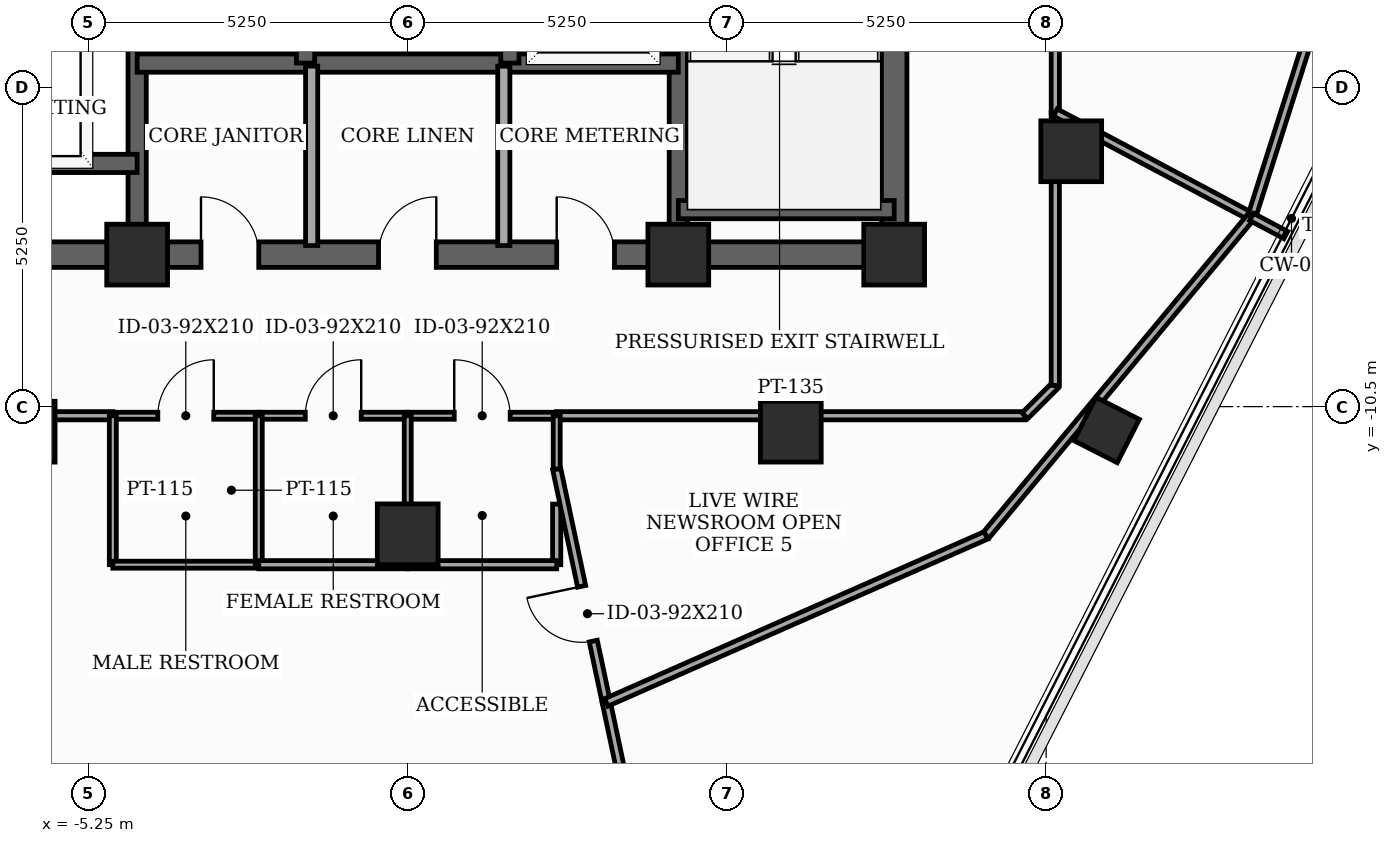
"""IFC4 building model, lengths in metres.
Left out: names, types, materials, properties, quantities, classifications, styles, units other than length and angle.
Written with IfcOpenShell. Run it as: python <this file> out.ifc"""

import sys

from ifc_helpers import new_model, si_unit, direction, frame, frame_2d, origin, origin_2d, place, context, subcontext, project, spatial, rectangle, extrude, element, fill, save


model = new_model("IFC4")
c1 = context("Model", 3, precision=1e-05, world=origin(), true_north=direction((0.0, 1.0)))
c2 = subcontext(c1, "Body", "Model", "MODEL_VIEW")
j1 = project(units=[si_unit("LENGTHUNIT", "METRE"), si_unit("PLANEANGLEUNIT", "RADIAN")], contexts=[c1])
p1 = place(None, origin())
s1 = spatial("IfcSite", under=j1, at=p1, CompositionType="ELEMENT")
p2 = place(p1, origin())
s2 = spatial("IfcBuilding", under=s1, at=p2, CompositionType="ELEMENT")
p3 = place(p2, frame((0.0, 0.0, 263.3)))
s3 = spatial("IfcBuildingStorey", under=s2, at=p3, CompositionType="ELEMENT", Elevation=263.3)
for number, where, z_axis, x_axis in (
    (1, (-4.45, -8.0, 0.0), (0.0, 0.0, 1.0), (1.0, 0.0, 0.0)),
    (2, (4.45, -8.0, 0.0), (0.0, 0.0, 1.0), (1.0, 0.0, 0.0)),
    (3, (8.0, -8.0, 0.0), (0.0, 0.0, 1.0), (1.0, 0.0, 0.0)),
    (4, (-6.3, -10.912, 0.0), (0.0, 0.0, 1.0), (1.0, 0.0, 0.0)),
    (5, (0.0, -12.6, 0.0), (0.0, 0.0, 1.0), (1.0, 0.0, 0.0)),
    (6, (6.3, -10.912, 0.0), (0.0, 0.0, 1.0), (1.0, 0.0, 0.0)),
    (7, (10.912, -6.3, 0.0), (0.0, 0.0, 1.0), (1.0, 0.0, 0.0)),
):
    element("IfcColumn", number, at=place(p3, frame(where, z_axis=z_axis, x_axis=x_axis)), inside=s3, PredefinedType="COLUMN", context=c2, shape_type="SweptSolid", body=[
        extrude(rectangle(XDim=1.0, YDim=1.0, at=origin_2d()), origin(), (0.0, 0.0, 1.0), 3.7),
    ])
p4 = place(p3, frame((11.494, -10.885, 0.0), z_axis=(0.0, 0.0, 1.0), x_axis=(0.45399049974, 0.891006524188, 0.0)))
e8 = element("IfcColumn", 8, at=p4, inside=s3, PredefinedType="COLUMN", context=c2, shape_type="SweptSolid", body=[
    extrude(rectangle(XDim=0.8, YDim=0.8, at=origin_2d()), origin(), (0.0, 0.0, 1.0), 3.7),
])
p5 = place(p3, frame((8.0, -8.0, 0.0), z_axis=(0.0, 0.0, 1.0), x_axis=(0.0, 1.0, 0.0)))
e9 = element("IfcWall", 9, at=p5, inside=s3, PredefinedType="SHEAR", context=c2, shape_type="SweptSolid", body=[
    extrude(rectangle(XDim=16.0, YDim=0.42, at=frame_2d((8.0, 0.0))), origin(), (0.0, 0.0, 1.0), 3.5),
])
p6 = place(p5, frame((9.6, 0.0, 0.0)))
e10 = element("IfcOpeningElement", 10, at=p6, cuts=e9, PredefinedType="OPENING", context=c2, shape_type="SweptSolid", body=[
    extrude(rectangle(XDim=1.05, YDim=2.15, at=frame_2d((0.525, 1.075))), frame((0.0, 0.22, 0.0), z_axis=(0.0, -1.0, 0.0), x_axis=(1.0, 0.0, 0.0)), (0.0, 0.0, 1.0), 0.44),
])
p7 = place(p5, frame((14.469, 0.0, 0.0)))
e11 = element("IfcOpeningElement", 11, at=p7, cuts=e9, PredefinedType="OPENING", context=c2, shape_type="SweptSolid", body=[
    extrude(rectangle(XDim=0.85, YDim=2.02, at=frame_2d((0.425, 1.01))), frame((0.0, 0.22, 0.0), z_axis=(0.0, -1.0, 0.0), x_axis=(1.0, 0.0, 0.0)), (0.0, 0.0, 1.0), 0.44),
])
p8 = place(p3, frame((-8.0, -8.0, 0.0), z_axis=(0.0, 0.0, 1.0), x_axis=(1.0, 0.0, 0.0)))
e12 = element("IfcWall", 12, at=p8, inside=s3, PredefinedType="SHEAR", context=c2, shape_type="SweptSolid", body=[
    extrude(rectangle(XDim=16.0, YDim=0.42, at=frame_2d((8.0, 0.0))), origin(), (0.0, 0.0, 1.0), 3.5),
])
p9 = place(p8, frame((4.6, 0.0, 0.0)))
e13 = element("IfcOpeningElement", 13, at=p9, cuts=e12, PredefinedType="OPENING", context=c2, shape_type="SweptSolid", body=[
    extrude(rectangle(XDim=0.95, YDim=2.1, at=frame_2d((0.475, 1.05))), frame((0.0, 0.22, 0.0), z_axis=(0.0, -1.0, 0.0), x_axis=(1.0, 0.0, 0.0)), (0.0, 0.0, 1.0), 0.44),
])
p10 = place(p8, frame((7.52, 0.0, 0.0)))
e14 = element("IfcOpeningElement", 14, at=p10, cuts=e12, PredefinedType="OPENING", context=c2, shape_type="SweptSolid", body=[
    extrude(rectangle(XDim=0.95, YDim=2.1, at=frame_2d((0.475, 1.05))), frame((0.0, 0.22, 0.0), z_axis=(0.0, -1.0, 0.0), x_axis=(1.0, 0.0, 0.0)), (0.0, 0.0, 1.0), 0.44),
])
p11 = place(p8, frame((10.45, 0.0, 0.0)))
e15 = element("IfcOpeningElement", 15, at=p11, cuts=e12, PredefinedType="OPENING", context=c2, shape_type="SweptSolid", body=[
    extrude(rectangle(XDim=0.95, YDim=2.1, at=frame_2d((0.475, 1.05))), frame((0.0, 0.22, 0.0), z_axis=(0.0, -1.0, 0.0), x_axis=(1.0, 0.0, 0.0)), (0.0, 0.0, 1.0), 0.44),
])
for number, where, z_axis, x_axis in (
    (16, (-4.45, -7.79, 0.0), (0.0, 0.0, 1.0), (0.0, 1.0, 0.0)),
    (17, (4.45, -7.79, 0.0), (0.0, 0.0, 1.0), (0.0, 1.0, 0.0)),
):
    element("IfcWall", number, at=place(p3, frame(where, z_axis=z_axis, x_axis=x_axis)), inside=s3, PredefinedType="SHEAR", context=c2, shape_type="SweptSolid", body=[
        extrude(rectangle(XDim=15.58, YDim=0.3, at=frame_2d((7.79, 0.0))), origin(), (0.0, 0.0, 1.0), 3.5),
    ])
p12 = place(p3, frame((4.45, -7.26, 0.0), z_axis=(0.0, 0.0, 1.0), x_axis=(1.0, 0.0, 0.0)))
e18 = element("IfcWall", 18, at=p12, inside=s3, PredefinedType="SHEAR", context=c2, shape_type="SweptSolid", body=[
    extrude(rectangle(XDim=3.55, YDim=0.3, at=frame_2d((1.775, 0.0))), origin(), (0.0, 0.0, 1.0), 3.5),
])
p13 = place(p3, frame((-7.79, -6.5, 0.0), z_axis=(0.0, 0.0, 1.0), x_axis=(1.0, 0.0, 0.0)))
e19 = element("IfcWall", 19, at=p13, inside=s3, PredefinedType="SHEAR", context=c2, shape_type="SweptSolid", body=[
    extrude(rectangle(XDim=3.34, YDim=0.3, at=frame_2d((1.67, 0.0))), origin(), (0.0, 0.0, 1.0), 3.5),
])
p14 = place(p3, frame((-4.45, -4.85, 0.0), z_axis=(0.0, 0.0, 1.0), x_axis=(1.0, 0.0, 0.0)))
e20 = element("IfcWall", 20, at=p14, inside=s3, PredefinedType="SHEAR", context=c2, shape_type="SweptSolid", body=[
    extrude(rectangle(XDim=8.9, YDim=0.3, at=frame_2d((4.45, 0.0))), origin(), (0.0, 0.0, 1.0), 3.5),
])
p15 = place(p3, frame((-1.68, -4.85, 0.0), z_axis=(0.0, 0.0, 1.0), x_axis=(0.0, 1.0, 0.0)))
e21 = element("IfcWall", 21, at=p15, inside=s3, PredefinedType="SHEAR", context=c2, shape_type="SweptSolid", body=[
    extrude(rectangle(XDim=12.64, YDim=0.3, at=frame_2d((6.32, 0.0))), origin(), (0.0, 0.0, 1.0), 3.5),
])
p16 = place(p15, frame((3.5, 0.0, 0.0)))
e22 = element("IfcOpeningElement", 22, at=p16, cuts=e21, PredefinedType="OPENING", context=c2, shape_type="SweptSolid", body=[
    extrude(rectangle(XDim=0.95, YDim=2.1, at=frame_2d((0.475, 1.05))), frame((0.0, 0.16, 0.0), z_axis=(0.0, -1.0, 0.0), x_axis=(1.0, 0.0, 0.0)), (0.0, 0.0, 1.0), 0.32),
])
p17 = place(p15, frame((9.8, 0.0, 0.0)))
e23 = element("IfcOpeningElement", 23, at=p17, cuts=e21, PredefinedType="OPENING", context=c2, shape_type="SweptSolid", body=[
    extrude(rectangle(XDim=0.95, YDim=2.1, at=frame_2d((0.475, 1.05))), frame((0.0, 0.16, 0.0), z_axis=(0.0, -1.0, 0.0), x_axis=(1.0, 0.0, 0.0)), (0.0, 0.0, 1.0), 0.32),
])
p18 = place(p3, frame((1.68, -4.85, 0.0), z_axis=(0.0, 0.0, 1.0), x_axis=(0.0, 1.0, 0.0)))
e24 = element("IfcWall", 24, at=p18, inside=s3, PredefinedType="SHEAR", context=c2, shape_type="SweptSolid", body=[
    extrude(rectangle(XDim=12.64, YDim=0.3, at=frame_2d((6.32, 0.0))), origin(), (0.0, 0.0, 1.0), 3.5),
])
p19 = place(p18, frame((0.55, 0.0, 0.0)))
e25 = element("IfcOpeningElement", 25, at=p19, cuts=e24, PredefinedType="OPENING", context=c2, shape_type="SweptSolid", body=[
    extrude(rectangle(XDim=1.1, YDim=2.1, at=frame_2d((0.55, 1.05))), frame((0.0, 0.16, 0.0), z_axis=(0.0, -1.0, 0.0), x_axis=(1.0, 0.0, 0.0)), (0.0, 0.0, 1.0), 0.32),
])
p20 = place(p18, frame((2.65, 0.0, 0.0)))
e26 = element("IfcOpeningElement", 26, at=p20, cuts=e24, PredefinedType="OPENING", context=c2, shape_type="SweptSolid", body=[
    extrude(rectangle(XDim=1.1, YDim=2.1, at=frame_2d((0.55, 1.05))), frame((0.0, 0.16, 0.0), z_axis=(0.0, -1.0, 0.0), x_axis=(1.0, 0.0, 0.0)), (0.0, 0.0, 1.0), 0.32),
])
p21 = place(p18, frame((4.75, 0.0, 0.0)))
e27 = element("IfcOpeningElement", 27, at=p21, cuts=e24, PredefinedType="OPENING", context=c2, shape_type="SweptSolid", body=[
    extrude(rectangle(XDim=1.1, YDim=2.1, at=frame_2d((0.55, 1.05))), frame((0.0, 0.16, 0.0), z_axis=(0.0, -1.0, 0.0), x_axis=(1.0, 0.0, 0.0)), (0.0, 0.0, 1.0), 0.32),
])
p22 = place(p18, frame((8.2, 0.0, 0.0)))
e28 = element("IfcOpeningElement", 28, at=p22, cuts=e24, PredefinedType="OPENING", context=c2, shape_type="SweptSolid", body=[
    extrude(rectangle(XDim=0.95, YDim=2.1, at=frame_2d((0.475, 1.05))), frame((0.0, 0.16, 0.0), z_axis=(0.0, -1.0, 0.0), x_axis=(1.0, 0.0, 0.0)), (0.0, 0.0, 1.0), 0.32),
])
p23 = place(p18, frame((11.25, 0.0, 0.0)))
e29 = element("IfcOpeningElement", 29, at=p23, cuts=e24, PredefinedType="OPENING", context=c2, shape_type="SweptSolid", body=[
    extrude(rectangle(XDim=0.95, YDim=2.1, at=frame_2d((0.475, 1.05))), frame((0.0, 0.16, 0.0), z_axis=(0.0, -1.0, 0.0), x_axis=(1.0, 0.0, 0.0)), (0.0, 0.0, 1.0), 0.32),
])
for number, where, z_axis, x_axis in (
    (30, (-1.58, -7.85, 0.0), (0.0, 0.0, 1.0), (0.0, 1.0, 0.0)),
    (31, (1.58, -7.85, 0.0), (0.0, 0.0, 1.0), (0.0, 1.0, 0.0)),
):
    element("IfcWall", number, at=place(p3, frame(where, z_axis=z_axis, x_axis=x_axis)), inside=s3, PredefinedType="SOLIDWALL", context=c2, shape_type="SweptSolid", body=[
        extrude(rectangle(XDim=2.95, YDim=0.2, at=frame_2d((1.475, 0.0))), origin(), (0.0, 0.0, 1.0), 2.885),
    ])
p24 = place(p3, frame((10.65, -5.663, 0.0), z_axis=(0.0, 0.0, 1.0), x_axis=(0.0, 1.0, 0.0)))
e32 = element("IfcWall", 32, at=p24, inside=s3, PredefinedType="PARTITIONING", context=c2, shape_type="SweptSolid", body=[
    extrude(rectangle(XDim=7.145, YDim=0.135, at=frame_2d((3.573, 0.0))), origin(), (0.0, 0.0, 1.0), 2.885),
])
p25 = place(p24, frame((3.097, 0.0, 0.0)))
e33 = element("IfcOpeningElement", 33, at=p25, cuts=e32, PredefinedType="OPENING", context=c2, shape_type="SweptSolid", body=[
    extrude(rectangle(XDim=0.95, YDim=2.1, at=frame_2d((0.475, 1.05))), frame((0.0, 0.077, 0.0), z_axis=(0.0, -1.0, 0.0), x_axis=(1.0, 0.0, 0.0)), (0.0, 0.0, 1.0), 0.155),
])
p26 = place(p3, frame((-4.85, -10.65, 0.0), z_axis=(0.0, 0.0, 1.0), x_axis=(1.0, 0.0, 0.0)))
e34 = element("IfcWall", 34, at=p26, inside=s3, PredefinedType="PARTITIONING", context=c2, shape_type="SweptSolid", body=[
    extrude(rectangle(XDim=2.4, YDim=0.115, at=frame_2d((1.2, 0.0))), origin(), (0.0, 0.0, 1.0), 3.5),
])
p27 = place(p26, frame((0.74, 0.0, 0.0)))
e35 = element("IfcOpeningElement", 35, at=p27, cuts=e34, PredefinedType="OPENING", context=c2, shape_type="SweptSolid", body=[
    extrude(rectangle(XDim=0.92, YDim=2.1, at=frame_2d((0.46, 1.05))), frame((0.0, 0.067, 0.0), z_axis=(0.0, -1.0, 0.0), x_axis=(1.0, 0.0, 0.0)), (0.0, 0.0, 1.0), 0.135),
])
p28 = place(p3, frame((-10.15, -10.65, 0.0), z_axis=(0.0, 0.0, 1.0), x_axis=(1.0, 0.0, 0.0)))
e36 = element("IfcWall", 36, at=p28, inside=s3, PredefinedType="PARTITIONING", context=c2, shape_type="SweptSolid", body=[
    extrude(rectangle(XDim=5.3, YDim=0.135, at=frame_2d((2.65, 0.0))), origin(), (0.0, 0.0, 1.0), 2.885),
])
p29 = place(p3, frame((-2.45, -10.65, 0.0), z_axis=(0.0, 0.0, 1.0), x_axis=(1.0, 0.0, 0.0)))
e37 = element("IfcWall", 37, at=p29, inside=s3, PredefinedType="PARTITIONING", context=c2, shape_type="SweptSolid", body=[
    extrude(rectangle(XDim=2.45, YDim=0.115, at=frame_2d((1.225, 0.0))), origin(), (0.0, 0.0, 1.0), 2.885),
])
p30 = place(p29, frame((0.765, 0.0, 0.0)))
e38 = element("IfcOpeningElement", 38, at=p30, cuts=e37, PredefinedType="OPENING", context=c2, shape_type="SweptSolid", body=[
    extrude(rectangle(XDim=0.92, YDim=2.1, at=frame_2d((0.46, 1.05))), frame((0.0, 0.067, 0.0), z_axis=(0.0, -1.0, 0.0), x_axis=(1.0, 0.0, 0.0)), (0.0, 0.0, 1.0), 0.135),
])
p31 = place(p3, frame((0.0, -10.65, 0.0), z_axis=(0.0, 0.0, 1.0), x_axis=(1.0, 0.0, 0.0)))
e39 = element("IfcWall", 39, at=p31, inside=s3, PredefinedType="PARTITIONING", context=c2, shape_type="SweptSolid", body=[
    extrude(rectangle(XDim=2.45, YDim=0.115, at=frame_2d((1.225, 0.0))), origin(), (0.0, 0.0, 1.0), 3.5),
])
p32 = place(p31, frame((0.765, 0.0, 0.0)))
e40 = element("IfcOpeningElement", 40, at=p32, cuts=e39, PredefinedType="OPENING", context=c2, shape_type="SweptSolid", body=[
    extrude(rectangle(XDim=0.92, YDim=2.1, at=frame_2d((0.46, 1.05))), frame((0.0, 0.067, 0.0), z_axis=(0.0, -1.0, 0.0), x_axis=(1.0, 0.0, 0.0)), (0.0, 0.0, 1.0), 0.135),
])
p33 = place(p3, frame((2.45, -10.65, 0.0), z_axis=(0.0, 0.0, 1.0), x_axis=(1.0, 0.0, 0.0)))
e41 = element("IfcWall", 41, at=p33, inside=s3, PredefinedType="PARTITIONING", context=c2, shape_type="SweptSolid", body=[
    extrude(rectangle(XDim=7.7, YDim=0.135, at=frame_2d((3.85, 0.0))), origin(), (0.0, 0.0, 1.0), 2.885),
])
p34 = place(p3, frame((10.15, -10.65, 0.0), z_axis=(0.0, 0.0, 1.0), x_axis=(0.707106781187, 0.707106781187, 0.0)))
e42 = element("IfcWall", 42, at=p34, inside=s3, PredefinedType="PARTITIONING", context=c2, shape_type="SweptSolid", body=[
    extrude(rectangle(XDim=0.707, YDim=0.135, at=frame_2d((0.354, 0.0))), origin(), (0.0, 0.0, 1.0), 3.5),
])
p35 = place(p3, frame((10.65, -10.15, 0.0), z_axis=(0.0, 0.0, 1.0), x_axis=(0.0, 1.0, 0.0)))
e43 = element("IfcWall", 43, at=p35, inside=s3, PredefinedType="PARTITIONING", context=c2, shape_type="SweptSolid", body=[
    extrude(rectangle(XDim=4.487, YDim=0.135, at=frame_2d((2.243, 0.0))), origin(), (0.0, 0.0, 1.0), 2.885),
])
p36 = place(p3, frame((10.65, -5.663, 0.0), z_axis=(0.0, 0.0, 1.0), x_axis=(0.882982204984, -0.469406461057, 0.0)))
e44 = element("IfcWall", 44, at=p36, inside=s3, PredefinedType="PARTITIONING", context=c2, shape_type="SweptSolid", body=[
    extrude(rectangle(XDim=3.647, YDim=0.135, at=frame_2d((1.823, 0.0))), origin(), (0.0, 0.0, 1.0), 2.885),
])
p37 = place(p3, frame((13.887, -7.354, 0.0), z_axis=(0.0, 0.0, 1.0), x_axis=(0.302867480059, 0.953032680197, 0.0)))
e45 = element("IfcWall", 45, at=p37, inside=s3, PredefinedType="PARTITIONING", context=c2, shape_type="SweptSolid", body=[
    extrude(rectangle(XDim=6.055, YDim=0.135, at=frame_2d((3.028, 0.0))), origin(), (0.0, 0.0, 1.0), 3.035),
])
p38 = place(p3, frame((-4.85, -10.65, 0.0), z_axis=(0.0, 0.0, 1.0), x_axis=(0.0, -1.0, 0.0)))
e46 = element("IfcWall", 46, at=p38, inside=s3, PredefinedType="PARTITIONING", context=c2, shape_type="SweptSolid", body=[
    extrude(rectangle(XDim=2.45, YDim=0.115, at=frame_2d((1.225, 0.0))), origin(), (0.0, 0.0, 1.0), 2.885),
])
p39 = place(p3, frame((-4.85, -13.1, 0.0), z_axis=(0.0, 0.0, 1.0), x_axis=(1.0, 0.0, 0.0)))
e47 = element("IfcWall", 47, at=p39, inside=s3, PredefinedType="PARTITIONING", context=c2, shape_type="SweptSolid", body=[
    extrude(rectangle(XDim=2.4, YDim=0.115, at=frame_2d((1.2, 0.0))), origin(), (0.0, 0.0, 1.0), 3.5),
])
p40 = place(p3, frame((-2.45, -13.1, 0.0), z_axis=(0.0, 0.0, 1.0), x_axis=(0.0, 1.0, 0.0)))
e48 = element("IfcWall", 48, at=p40, inside=s3, PredefinedType="PARTITIONING", context=c2, shape_type="SweptSolid", body=[
    extrude(rectangle(XDim=2.45, YDim=0.115, at=frame_2d((1.225, 0.0))), origin(), (0.0, 0.0, 1.0), 2.885),
])
p41 = place(p3, frame((0.0, -13.1, 0.0), z_axis=(0.0, 0.0, 1.0), x_axis=(-1.0, 0.0, 0.0)))
e49 = element("IfcWall", 49, at=p41, inside=s3, PredefinedType="PARTITIONING", context=c2, shape_type="SweptSolid", body=[
    extrude(rectangle(XDim=2.45, YDim=0.135, at=frame_2d((1.225, 0.0))), origin(), (0.0, 0.0, 1.0), 3.5),
])
p42 = place(p3, frame((2.45, -12.103, 0.0), z_axis=(0.0, 0.0, 1.0), x_axis=(0.0, -1.0, 0.0)))
e50 = element("IfcWall", 50, at=p42, inside=s3, PredefinedType="PARTITIONING", context=c2, shape_type="SweptSolid", body=[
    extrude(rectangle(XDim=0.997, YDim=0.135, at=frame_2d((0.499, 0.0))), origin(), (0.0, 0.0, 1.0), 2.885),
])
p43 = place(p3, frame((2.45, -13.1, 0.0), z_axis=(0.0, 0.0, 1.0), x_axis=(-1.0, 0.0, 0.0)))
e51 = element("IfcWall", 51, at=p43, inside=s3, PredefinedType="PARTITIONING", context=c2, shape_type="SweptSolid", body=[
    extrude(rectangle(XDim=2.45, YDim=0.135, at=frame_2d((1.225, 0.0))), origin(), (0.0, 0.0, 1.0), 3.5),
])
p44 = place(p3, frame((5.402, -25.417, 0.0), z_axis=(0.0, 0.0, 1.0), x_axis=(-0.207847958891, 0.978161145203, 0.0)))
e52 = element("IfcWall", 52, at=p44, inside=s3, PredefinedType="PARTITIONING", context=c2, shape_type="SweptSolid", body=[
    extrude(rectangle(XDim=10.277, YDim=0.135, at=frame_2d((5.138, 0.0))), origin(), (0.0, 0.0, 1.0), 3.035),
])
p45 = place(p44, frame((4.678, 0.0, 0.0)))
e53 = element("IfcOpeningElement", 53, at=p45, cuts=e52, PredefinedType="OPENING", context=c2, shape_type="SweptSolid", body=[
    extrude(rectangle(XDim=0.92, YDim=2.1, at=frame_2d((0.46, 1.05))), frame((0.0, 0.077, 0.0), z_axis=(0.0, -1.0, 0.0), x_axis=(1.0, 0.0, 0.0)), (0.0, 0.0, 1.0), 0.155),
])
p46 = place(p3, frame((3.266, -15.365, 0.0), z_axis=(0.0, 0.0, 1.0), x_axis=(-0.207944308429, 0.978140667078, 0.0)))
e54 = element("IfcWall", 54, at=p46, inside=s3, PredefinedType="PARTITIONING", context=c2, shape_type="SweptSolid", body=[
    extrude(rectangle(XDim=3.925, YDim=0.135, at=frame_2d((1.962, 0.0))), origin(), (0.0, 0.0, 1.0), 2.885),
])
p47 = place(p46, frame((1.031, 0.0, 0.0)))
e55 = element("IfcOpeningElement", 55, at=p47, cuts=e54, PredefinedType="OPENING", context=c2, shape_type="SweptSolid", body=[
    extrude(rectangle(XDim=0.92, YDim=2.1, at=frame_2d((0.46, 1.05))), frame((0.0, 0.077, 0.0), z_axis=(0.0, -1.0, 0.0), x_axis=(1.0, 0.0, 0.0)), (0.0, 0.0, 1.0), 0.155),
])
p48 = place(p3, frame((0.0, -13.1, 0.0), z_axis=(0.0, 0.0, 1.0), x_axis=(0.0, 1.0, 0.0)))
e56 = element("IfcWall", 56, at=p48, inside=s3, PredefinedType="PARTITIONING", context=c2, shape_type="SweptSolid", body=[
    extrude(rectangle(XDim=2.45, YDim=0.115, at=frame_2d((1.225, 0.0))), origin(), (0.0, 0.0, 1.0), 2.885),
])
p49 = place(p3, frame((2.45, -11.526, 0.0), z_axis=(0.0, 0.0, 1.0), x_axis=(0.0, 1.0, 0.0)))
e57 = element("IfcWall", 57, at=p49, inside=s3, PredefinedType="PARTITIONING", context=c2, shape_type="SweptSolid", body=[
    extrude(rectangle(XDim=0.876, YDim=0.115, at=frame_2d((0.438, 0.0))), origin(), (0.0, 0.0, 1.0), 3.5),
])
p50 = place(p3, frame((13.87, -7.375, 0.0), z_axis=(0.0, 0.0, 1.0), x_axis=(-0.63949044568, -0.768799043888, 0.0)))
e58 = element("IfcWall", 58, at=p50, inside=s3, PredefinedType="PARTITIONING", context=c2, shape_type="SweptSolid", body=[
    extrude(rectangle(XDim=6.82, YDim=0.135, at=frame_2d((3.41, 0.0))), origin(), (0.0, 0.0, 1.0), 3.035),
])
p51 = place(p3, frame((9.509, -12.618, 0.0), z_axis=(0.0, 0.0, 1.0), x_axis=(-0.915305003879, -0.402761405641, 0.0)))
e59 = element("IfcWall", 59, at=p51, inside=s3, PredefinedType="PARTITIONING", context=c2, shape_type="SweptSolid", body=[
    extrude(rectangle(XDim=6.821, YDim=0.135, at=frame_2d((3.41, 0.0))), origin(), (0.0, 0.0, 1.0), 3.035),
])
p52 = place(p3, frame((14.441, -7.678, 0.0), z_axis=(0.0, 0.0, 1.0), x_axis=(-0.883423592085, 0.468575241501, 0.0)))
e60 = element("IfcWall", 60, at=p52, inside=s3, PredefinedType="PARTITIONING", context=c2, shape_type="SweptSolid", body=[
    extrude(rectangle(XDim=0.636, YDim=0.135, at=frame_2d((0.318, 0.0))), origin(), (0.0, 0.0, 1.0), 3.5),
])
p53 = place(p9, origin())
e61 = element("IfcDoor", 61, at=p53, inside=s3, OperationType="SINGLE_SWING_LEFT", PredefinedType="DOOR", context=c2, shape_type="SweptSolid", body=[
    extrude(rectangle(XDim=0.95, YDim=2.1, at=frame_2d((0.475, 1.05))), frame((0.0, 0.025, 0.0), z_axis=(0.0, -1.0, 0.0), x_axis=(1.0, 0.0, 0.0)), (0.0, 0.0, 1.0), 0.05),
])
fill(e13, e61)
p54 = place(p10, origin())
e62 = element("IfcDoor", 62, at=p54, inside=s3, OperationType="SINGLE_SWING_RIGHT", PredefinedType="DOOR", context=c2, shape_type="SweptSolid", body=[
    extrude(rectangle(XDim=0.95, YDim=2.1, at=frame_2d((0.475, 1.05))), frame((0.0, 0.025, 0.0), z_axis=(0.0, -1.0, 0.0), x_axis=(1.0, 0.0, 0.0)), (0.0, 0.0, 1.0), 0.05),
])
fill(e14, e62)
p55 = place(p11, origin())
e63 = element("IfcDoor", 63, at=p55, inside=s3, OperationType="SINGLE_SWING_LEFT", PredefinedType="DOOR", context=c2, shape_type="SweptSolid", body=[
    extrude(rectangle(XDim=0.95, YDim=2.1, at=frame_2d((0.475, 1.05))), frame((0.0, 0.025, 0.0), z_axis=(0.0, -1.0, 0.0), x_axis=(1.0, 0.0, 0.0)), (0.0, 0.0, 1.0), 0.05),
])
fill(e15, e63)
p56 = place(p27, origin())
e64 = element("IfcDoor", 64, at=p56, inside=s3, OperationType="SINGLE_SWING_RIGHT", PredefinedType="DOOR", context=c2, shape_type="SweptSolid", body=[
    extrude(rectangle(XDim=0.92, YDim=2.1, at=frame_2d((0.46, 1.05))), frame((0.0, 0.025, 0.0), z_axis=(0.0, -1.0, 0.0), x_axis=(1.0, 0.0, 0.0)), (0.0, 0.0, 1.0), 0.05),
])
fill(e35, e64)
p57 = place(p30, origin())
e65 = element("IfcDoor", 65, at=p57, inside=s3, OperationType="SINGLE_SWING_RIGHT", PredefinedType="DOOR", context=c2, shape_type="SweptSolid", body=[
    extrude(rectangle(XDim=0.92, YDim=2.1, at=frame_2d((0.46, 1.05))), frame((0.0, 0.025, 0.0), z_axis=(0.0, -1.0, 0.0), x_axis=(1.0, 0.0, 0.0)), (0.0, 0.0, 1.0), 0.05),
])
fill(e38, e65)
p58 = place(p32, origin())
e66 = element("IfcDoor", 66, at=p58, inside=s3, OperationType="SINGLE_SWING_LEFT", PredefinedType="DOOR", context=c2, shape_type="SweptSolid", body=[
    extrude(rectangle(XDim=0.92, YDim=2.1, at=frame_2d((0.46, 1.05))), frame((0.0, 0.025, 0.0), z_axis=(0.0, -1.0, 0.0), x_axis=(1.0, 0.0, 0.0)), (0.0, 0.0, 1.0), 0.05),
])
fill(e40, e66)
p59 = place(p47, origin())
e67 = element("IfcDoor", 67, at=p59, inside=s3, OperationType="SINGLE_SWING_RIGHT", PredefinedType="DOOR", context=c2, shape_type="SweptSolid", body=[
    extrude(rectangle(XDim=0.92, YDim=2.1, at=frame_2d((0.46, 1.05))), frame((0.0, 0.025, 0.0), z_axis=(0.0, -1.0, 0.0), x_axis=(1.0, 0.0, 0.0)), (0.0, 0.0, 1.0), 0.05),
])
fill(e55, e67)
save(model, sys.argv[1])
